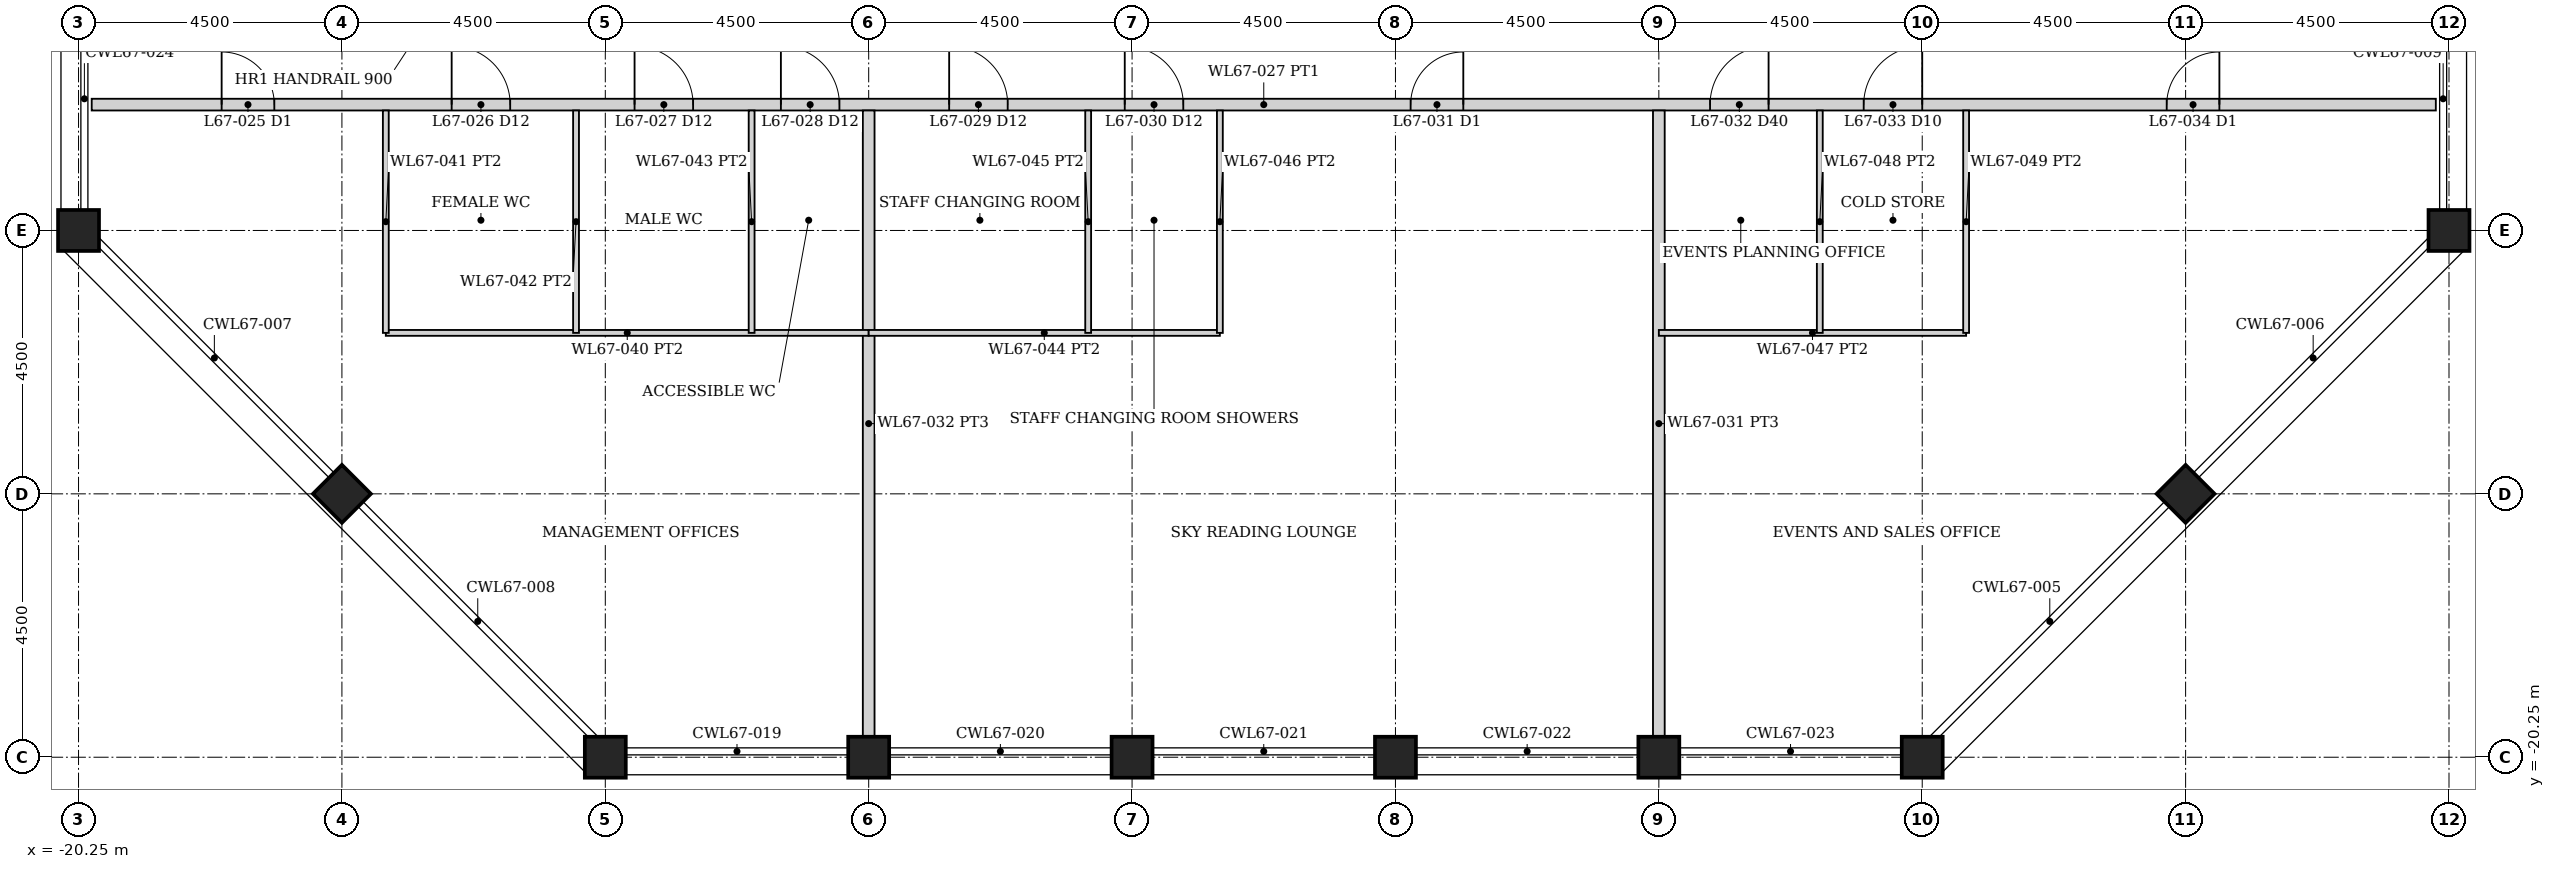
"""IFC4 building model, lengths in metres.
Left out: names, types, materials, properties, quantities, classifications, styles, units other than length and angle.
Written with IfcOpenShell. Run it as: python <this file> out.ifc"""

import sys

from ifc_helpers import new_model, si_unit, direction, frame, frame_2d, origin, origin_2d, place, context, subcontext, project, spatial, rectangle, hollow_rectangle, extrude, element, fill, save


model = new_model("IFC4")
c1 = context("Model", 3, precision=1e-05, world=origin(), true_north=direction((0.0, 1.0)))
c2 = subcontext(c1, "Body", "Model", "MODEL_VIEW")
j1 = project(units=[si_unit("LENGTHUNIT", "METRE"), si_unit("PLANEANGLEUNIT", "RADIAN")], contexts=[c1])
p1 = place(None, origin())
s1 = spatial("IfcSite", under=j1, at=p1, CompositionType="ELEMENT")
p2 = place(p1, origin())
s2 = spatial("IfcBuilding", under=s1, at=p2, CompositionType="ELEMENT")
p3 = place(p2, frame((0.0, 0.0, 257.05)))
s3 = spatial("IfcBuildingStorey", under=s2, at=p3, CompositionType="ELEMENT", Elevation=257.05)
for number, where, z_axis, x_axis in (
    (1, (-11.25, -20.25, 0.0), (0.0, 0.0, 1.0), (0.0, 1.0, 0.0)),
    (2, (20.25, -11.25, 0.0), (0.0, 0.0, 1.0), (1.0, 0.0, 0.0)),
    (3, (-20.25, -11.25, 0.0), (0.0, 0.0, 1.0), (1.0, 0.0, 0.0)),
    (4, (-6.75, -20.25, 0.0), (0.0, 0.0, 1.0), (0.0, 1.0, 0.0)),
    (5, (-2.25, -20.25, 0.0), (0.0, 0.0, 1.0), (0.0, 1.0, 0.0)),
    (6, (2.25, -20.25, 0.0), (0.0, 0.0, 1.0), (0.0, 1.0, 0.0)),
    (7, (6.75, -20.25, 0.0), (0.0, 0.0, 1.0), (0.0, 1.0, 0.0)),
    (8, (11.25, -20.25, 0.0), (0.0, 0.0, 1.0), (0.0, 1.0, 0.0)),
    (9, (15.75, -15.75, 0.0), (0.0, 0.0, 1.0), (0.707, -0.707, 0.0)),
    (10, (-15.75, -15.75, 0.0), (0.0, 0.0, 1.0), (0.707, 0.707, 0.0)),
):
    element("IfcColumn", number, at=place(p3, frame(where, z_axis=z_axis, x_axis=x_axis)), inside=s3, PredefinedType="COLUMN", context=c2, shape_type="SweptSolid", body=[
        extrude(hollow_rectangle(XDim=0.7, YDim=0.7, WallThickness=0.035, at=origin_2d()), origin(), (0.0, 0.0, 1.0), 5.0),
    ])
p4 = place(p3, frame((-20.025, -9.1, 0.0), z_axis=(0.0, 0.0, 1.0), x_axis=(1.0, 0.0, 0.0)))
e11 = element("IfcWall", 11, at=p4, inside=s3, PredefinedType="PARTITIONING", context=c2, shape_type="SweptSolid", body=[
    extrude(rectangle(XDim=40.05, YDim=0.2, at=frame_2d((20.025, 0.0))), origin(), (0.0, 0.0, 1.0), 3.823),
])
p5 = place(p4, frame((2.22, 0.0, 0.0)))
e12 = element("IfcOpeningElement", 12, at=p5, cuts=e11, PredefinedType="OPENING", context=c2, shape_type="SweptSolid", body=[
    extrude(rectangle(XDim=0.9, YDim=2.1, at=frame_2d((0.45, 1.05))), frame((0.0, 0.11, 0.0), z_axis=(0.0, -1.0, 0.0), x_axis=(1.0, 0.0, 0.0)), (0.0, 0.0, 1.0), 0.22),
])
p6 = place(p4, frame((6.15, 0.0, 0.0)))
e13 = element("IfcOpeningElement", 13, at=p6, cuts=e11, PredefinedType="OPENING", context=c2, shape_type="SweptSolid", body=[
    extrude(rectangle(XDim=1.0, YDim=2.1, at=frame_2d((0.5, 1.05))), frame((0.0, 0.11, 0.0), z_axis=(0.0, -1.0, 0.0), x_axis=(1.0, 0.0, 0.0)), (0.0, 0.0, 1.0), 0.22),
])
p7 = place(p4, frame((9.275, 0.0, 0.0)))
e14 = element("IfcOpeningElement", 14, at=p7, cuts=e11, PredefinedType="OPENING", context=c2, shape_type="SweptSolid", body=[
    extrude(rectangle(XDim=1.0, YDim=2.1, at=frame_2d((0.5, 1.05))), frame((0.0, 0.11, 0.0), z_axis=(0.0, -1.0, 0.0), x_axis=(1.0, 0.0, 0.0)), (0.0, 0.0, 1.0), 0.22),
])
p8 = place(p4, frame((11.775, 0.0, 0.0)))
e15 = element("IfcOpeningElement", 15, at=p8, cuts=e11, PredefinedType="OPENING", context=c2, shape_type="SweptSolid", body=[
    extrude(rectangle(XDim=1.0, YDim=2.1, at=frame_2d((0.5, 1.05))), frame((0.0, 0.11, 0.0), z_axis=(0.0, -1.0, 0.0), x_axis=(1.0, 0.0, 0.0)), (0.0, 0.0, 1.0), 0.22),
])
p9 = place(p4, frame((22.534, 0.0, 0.0)))
e16 = element("IfcOpeningElement", 16, at=p9, cuts=e11, PredefinedType="OPENING", context=c2, shape_type="SweptSolid", body=[
    extrude(rectangle(XDim=0.9, YDim=2.1, at=frame_2d((0.45, 1.05))), frame((0.0, 0.11, 0.0), z_axis=(0.0, -1.0, 0.0), x_axis=(1.0, 0.0, 0.0)), (0.0, 0.0, 1.0), 0.22),
])
p10 = place(p4, frame((14.65, 0.0, 0.0)))
e17 = element("IfcOpeningElement", 17, at=p10, cuts=e11, PredefinedType="OPENING", context=c2, shape_type="SweptSolid", body=[
    extrude(rectangle(XDim=1.0, YDim=2.1, at=frame_2d((0.5, 1.05))), frame((0.0, 0.11, 0.0), z_axis=(0.0, -1.0, 0.0), x_axis=(1.0, 0.0, 0.0)), (0.0, 0.0, 1.0), 0.22),
])
p11 = place(p4, frame((17.65, 0.0, 0.0)))
e18 = element("IfcOpeningElement", 18, at=p11, cuts=e11, PredefinedType="OPENING", context=c2, shape_type="SweptSolid", body=[
    extrude(rectangle(XDim=1.0, YDim=2.1, at=frame_2d((0.5, 1.05))), frame((0.0, 0.11, 0.0), z_axis=(0.0, -1.0, 0.0), x_axis=(1.0, 0.0, 0.0)), (0.0, 0.0, 1.0), 0.22),
])
p12 = place(p4, frame((35.452, 0.0, 0.0)))
e19 = element("IfcOpeningElement", 19, at=p12, cuts=e11, PredefinedType="OPENING", context=c2, shape_type="SweptSolid", body=[
    extrude(rectangle(XDim=0.9, YDim=2.1, at=frame_2d((0.45, 1.05))), frame((0.0, 0.11, 0.0), z_axis=(0.0, -1.0, 0.0), x_axis=(1.0, 0.0, 0.0)), (0.0, 0.0, 1.0), 0.22),
])
p13 = place(p4, frame((27.65, 0.0, 0.0)))
e20 = element("IfcOpeningElement", 20, at=p13, cuts=e11, PredefinedType="OPENING", context=c2, shape_type="SweptSolid", body=[
    extrude(rectangle(XDim=1.0, YDim=2.1, at=frame_2d((0.5, 1.05))), frame((0.0, 0.11, 0.0), z_axis=(0.0, -1.0, 0.0), x_axis=(1.0, 0.0, 0.0)), (0.0, 0.0, 1.0), 0.22),
])
p14 = place(p4, frame((30.275, 0.0, 0.0)))
e21 = element("IfcOpeningElement", 21, at=p14, cuts=e11, PredefinedType="OPENING", context=c2, shape_type="SweptSolid", body=[
    extrude(rectangle(XDim=1.0, YDim=2.1, at=frame_2d((0.5, 1.05))), frame((0.0, 0.11, 0.0), z_axis=(0.0, -1.0, 0.0), x_axis=(1.0, 0.0, 0.0)), (0.0, 0.0, 1.0), 0.22),
])
for number, where, z_axis, x_axis in (
    (22, (-6.75, -19.9, 0.0), (0.0, 0.0, 1.0), (0.0, 1.0, 0.0)),
    (23, (6.75, -19.9, 0.0), (0.0, 0.0, 1.0), (0.0, 1.0, 0.0)),
):
    element("IfcWall", number, at=place(p3, frame(where, z_axis=z_axis, x_axis=x_axis)), inside=s3, PredefinedType="PARTITIONING", context=c2, shape_type="SweptSolid", body=[
        extrude(rectangle(XDim=10.7, YDim=0.2, at=frame_2d((5.35, 0.0))), origin(), (0.0, 0.0, 1.0), 3.823),
    ])
p15 = place(p3, frame((-15.0, -13.0, 0.0), z_axis=(0.0, 0.0, 1.0), x_axis=(1.0, 0.0, 0.0)))
e24 = element("IfcWall", 24, at=p15, inside=s3, PredefinedType="PARTITIONING", context=c2, shape_type="SweptSolid", body=[
    extrude(rectangle(XDim=8.25, YDim=0.1, at=frame_2d((4.125, 0.0))), origin(), (0.0, 0.0, 1.0), 3.823),
])
for number, where, z_axis, x_axis in (
    (25, (-15.0, -13.0, 0.0), (0.0, 0.0, 1.0), (0.0, 1.0, 0.0)),
    (26, (-11.75, -13.0, 0.0), (0.0, 0.0, 1.0), (0.0, 1.0, 0.0)),
    (27, (-8.75, -13.0, 0.0), (0.0, 0.0, 1.0), (0.0, 1.0, 0.0)),
):
    element("IfcWall", number, at=place(p3, frame(where, z_axis=z_axis, x_axis=x_axis)), inside=s3, PredefinedType="PARTITIONING", context=c2, shape_type="SweptSolid", body=[
        extrude(rectangle(XDim=3.8, YDim=0.1, at=frame_2d((1.9, 0.0))), origin(), (0.0, 0.0, 1.0), 3.823),
    ])
p16 = place(p3, frame((-6.75, -13.0, 0.0), z_axis=(0.0, 0.0, 1.0), x_axis=(1.0, 0.0, 0.0)))
e28 = element("IfcWall", 28, at=p16, inside=s3, PredefinedType="PARTITIONING", context=c2, shape_type="SweptSolid", body=[
    extrude(rectangle(XDim=6.0, YDim=0.1, at=frame_2d((3.0, 0.0))), origin(), (0.0, 0.0, 1.0), 3.823),
])
for number, where, z_axis, x_axis in (
    (29, (-3.0, -13.0, 0.0), (0.0, 0.0, 1.0), (0.0, 1.0, 0.0)),
    (30, (-0.75, -13.0, 0.0), (0.0, 0.0, 1.0), (0.0, 1.0, 0.0)),
):
    element("IfcWall", number, at=place(p3, frame(where, z_axis=z_axis, x_axis=x_axis)), inside=s3, PredefinedType="PARTITIONING", context=c2, shape_type="SweptSolid", body=[
        extrude(rectangle(XDim=3.8, YDim=0.1, at=frame_2d((1.9, 0.0))), origin(), (0.0, 0.0, 1.0), 3.823),
    ])
p17 = place(p3, frame((6.75, -13.0, 0.0), z_axis=(0.0, 0.0, 1.0), x_axis=(1.0, 0.0, 0.0)))
e31 = element("IfcWall", 31, at=p17, inside=s3, PredefinedType="PARTITIONING", context=c2, shape_type="SweptSolid", body=[
    extrude(rectangle(XDim=5.25, YDim=0.1, at=frame_2d((2.625, 0.0))), origin(), (0.0, 0.0, 1.0), 3.823),
])
for number, where, z_axis, x_axis in (
    (32, (9.5, -13.0, 0.0), (0.0, 0.0, 1.0), (0.0, 1.0, 0.0)),
    (33, (12.0, -13.0, 0.0), (0.0, 0.0, 1.0), (0.0, 1.0, 0.0)),
):
    element("IfcWall", number, at=place(p3, frame(where, z_axis=z_axis, x_axis=x_axis)), inside=s3, PredefinedType="PARTITIONING", context=c2, shape_type="SweptSolid", body=[
        extrude(rectangle(XDim=3.8, YDim=0.1, at=frame_2d((1.9, 0.0))), origin(), (0.0, 0.0, 1.0), 3.823),
    ])
p18 = place(p5, origin())
e34 = element("IfcDoor", 34, at=p18, inside=s3, OperationType="SINGLE_SWING_LEFT", PredefinedType="DOOR", context=c2, shape_type="SweptSolid", body=[
    extrude(rectangle(XDim=0.9, YDim=2.1, at=frame_2d((0.45, 1.05))), frame((0.0, 0.025, 0.0), z_axis=(0.0, -1.0, 0.0), x_axis=(1.0, 0.0, 0.0)), (0.0, 0.0, 1.0), 0.05),
])
fill(e12, e34)
p19 = place(p6, origin())
e35 = element("IfcDoor", 35, at=p19, inside=s3, OperationType="SINGLE_SWING_LEFT", PredefinedType="DOOR", context=c2, shape_type="SweptSolid", body=[
    extrude(rectangle(XDim=1.0, YDim=2.1, at=frame_2d((0.5, 1.05))), frame((0.0, 0.025, 0.0), z_axis=(0.0, -1.0, 0.0), x_axis=(1.0, 0.0, 0.0)), (0.0, 0.0, 1.0), 0.05),
])
fill(e13, e35)
p20 = place(p7, origin())
e36 = element("IfcDoor", 36, at=p20, inside=s3, OperationType="SINGLE_SWING_LEFT", PredefinedType="DOOR", context=c2, shape_type="SweptSolid", body=[
    extrude(rectangle(XDim=1.0, YDim=2.1, at=frame_2d((0.5, 1.05))), frame((0.0, 0.025, 0.0), z_axis=(0.0, -1.0, 0.0), x_axis=(1.0, 0.0, 0.0)), (0.0, 0.0, 1.0), 0.05),
])
fill(e14, e36)
p21 = place(p8, origin())
e37 = element("IfcDoor", 37, at=p21, inside=s3, OperationType="SINGLE_SWING_LEFT", PredefinedType="DOOR", context=c2, shape_type="SweptSolid", body=[
    extrude(rectangle(XDim=1.0, YDim=2.1, at=frame_2d((0.5, 1.05))), frame((0.0, 0.025, 0.0), z_axis=(0.0, -1.0, 0.0), x_axis=(1.0, 0.0, 0.0)), (0.0, 0.0, 1.0), 0.05),
])
fill(e15, e37)
p22 = place(p9, origin())
e38 = element("IfcDoor", 38, at=p22, inside=s3, OperationType="SINGLE_SWING_RIGHT", PredefinedType="DOOR", context=c2, shape_type="SweptSolid", body=[
    extrude(rectangle(XDim=0.9, YDim=2.1, at=frame_2d((0.45, 1.05))), frame((0.0, 0.025, 0.0), z_axis=(0.0, -1.0, 0.0), x_axis=(1.0, 0.0, 0.0)), (0.0, 0.0, 1.0), 0.05),
])
fill(e16, e38)
p23 = place(p10, origin())
e39 = element("IfcDoor", 39, at=p23, inside=s3, OperationType="SINGLE_SWING_LEFT", PredefinedType="DOOR", context=c2, shape_type="SweptSolid", body=[
    extrude(rectangle(XDim=1.0, YDim=2.1, at=frame_2d((0.5, 1.05))), frame((0.0, 0.025, 0.0), z_axis=(0.0, -1.0, 0.0), x_axis=(1.0, 0.0, 0.0)), (0.0, 0.0, 1.0), 0.05),
])
fill(e17, e39)
p24 = place(p11, origin())
e40 = element("IfcDoor", 40, at=p24, inside=s3, OperationType="SINGLE_SWING_LEFT", PredefinedType="DOOR", context=c2, shape_type="SweptSolid", body=[
    extrude(rectangle(XDim=1.0, YDim=2.1, at=frame_2d((0.5, 1.05))), frame((0.0, 0.025, 0.0), z_axis=(0.0, -1.0, 0.0), x_axis=(1.0, 0.0, 0.0)), (0.0, 0.0, 1.0), 0.05),
])
fill(e18, e40)
p25 = place(p12, origin())
e41 = element("IfcDoor", 41, at=p25, inside=s3, OperationType="SINGLE_SWING_RIGHT", PredefinedType="DOOR", context=c2, shape_type="SweptSolid", body=[
    extrude(rectangle(XDim=0.9, YDim=2.1, at=frame_2d((0.45, 1.05))), frame((0.0, 0.025, 0.0), z_axis=(0.0, -1.0, 0.0), x_axis=(1.0, 0.0, 0.0)), (0.0, 0.0, 1.0), 0.05),
])
fill(e19, e41)
p26 = place(p13, origin())
e42 = element("IfcDoor", 42, at=p26, inside=s3, OperationType="SINGLE_SWING_RIGHT", PredefinedType="DOOR", context=c2, shape_type="SweptSolid", body=[
    extrude(rectangle(XDim=1.0, YDim=2.1, at=frame_2d((0.5, 1.05))), frame((0.0, 0.025, 0.0), z_axis=(0.0, -1.0, 0.0), x_axis=(1.0, 0.0, 0.0)), (0.0, 0.0, 1.0), 0.05),
])
fill(e20, e42)
p27 = place(p14, origin())
e43 = element("IfcDoor", 43, at=p27, inside=s3, OperationType="SINGLE_SWING_RIGHT", PredefinedType="DOOR", context=c2, shape_type="SweptSolid", body=[
    extrude(rectangle(XDim=1.0, YDim=2.1, at=frame_2d((0.5, 1.05))), frame((0.0, 0.025, 0.0), z_axis=(0.0, -1.0, 0.0), x_axis=(1.0, 0.0, 0.0)), (0.0, 0.0, 1.0), 0.05),
])
fill(e21, e43)
save(model, sys.argv[1])
